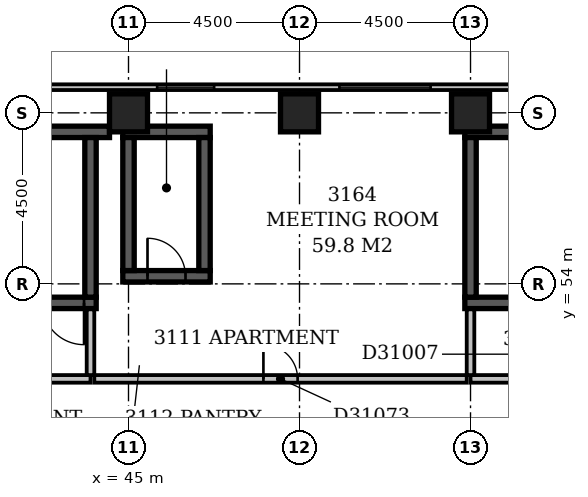
"""IFC4 building model, lengths in metres.
Left out: names, types, materials, properties, quantities, classifications, styles, units other than length and angle.
Written with IfcOpenShell. Run it as: python <this file> out.ifc"""

import sys

from ifc_helpers import new_model, si_unit, direction, frame, frame_2d, origin, origin_2d, place, context, subcontext, project, spatial, rectangle, extrude, element, fill, save


model = new_model("IFC4")
c1 = context("Model", 3, precision=1e-05, world=origin(), true_north=direction((0.0, 1.0)))
c2 = subcontext(c1, "Body", "Model", "MODEL_VIEW")
j1 = project(units=[si_unit("LENGTHUNIT", "METRE"), si_unit("PLANEANGLEUNIT", "RADIAN")], contexts=[c1])
p1 = place(None, origin())
s1 = spatial("IfcSite", under=j1, at=p1, CompositionType="ELEMENT")
p2 = place(p1, origin())
s2 = spatial("IfcBuilding", under=s1, at=p2, CompositionType="ELEMENT")
p3 = place(p2, frame((0.0, 0.0, 126.8)))
s3 = spatial("IfcBuildingStorey", under=s2, at=p3, CompositionType="ELEMENT", Elevation=126.8)
p4 = place(p3, frame((37.15, 53.5, -0.3), z_axis=(0.0, 0.0, 1.0), x_axis=(1.0, 0.0, 0.0)))
e1 = element("IfcWall", 1, at=p4, inside=s3, PredefinedType="SHEAR", context=c2, shape_type="SweptSolid", body=[
    extrude(rectangle(XDim=7.0, YDim=0.3, at=frame_2d((3.5, 0.0))), origin(), (0.0, 0.0, 1.0), 3.6),
])
p5 = place(p4, frame((5.58, 0.0, 0.3)))
e2 = element("IfcOpeningElement", 2, at=p5, cuts=e1, PredefinedType="OPENING", context=c2, shape_type="SweptSolid", body=[
    extrude(rectangle(XDim=1.1, YDim=2.1, at=frame_2d((0.55, 1.05))), frame((0.0, 0.162, 0.0), z_axis=(0.0, -1.0, 0.0), x_axis=(1.0, 0.0, 0.0)), (0.0, 0.0, 1.0), 0.324),
])
p6 = place(p3, frame((37.15, 58.0, -0.3), z_axis=(0.0, 0.0, 1.0), x_axis=(1.0, 0.0, 0.0)))
e3 = element("IfcWall", 3, at=p6, inside=s3, PredefinedType="SHEAR", context=c2, shape_type="SweptSolid", body=[
    extrude(rectangle(XDim=7.35, YDim=0.3, at=frame_2d((3.675, 0.0))), origin(), (0.0, 0.0, 1.0), 3.6),
])
p7 = place(p3, frame((44.0, 53.65, -0.3), z_axis=(0.0, 0.0, 1.0), x_axis=(0.0, 1.0, 0.0)))
e4 = element("IfcWall", 4, at=p7, inside=s3, PredefinedType="SHEAR", context=c2, shape_type="SweptSolid", body=[
    extrude(rectangle(XDim=4.2, YDim=0.3, at=frame_2d((2.1, 0.0))), origin(), (0.0, 0.0, 1.0), 3.6),
])
p8 = place(p3, frame((44.85, 54.2, -0.3), z_axis=(0.0, 0.0, 1.0), x_axis=(1.0, 0.0, 0.0)))
e5 = element("IfcWall", 5, at=p8, inside=s3, PredefinedType="SHEAR", context=c2, shape_type="SweptSolid", body=[
    extrude(rectangle(XDim=2.3, YDim=0.3, at=frame_2d((1.15, 0.0))), origin(), (0.0, 0.0, 1.0), 3.6),
])
p9 = place(p8, frame((0.65, 0.0, 0.3)))
e6 = element("IfcOpeningElement", 6, at=p9, cuts=e5, PredefinedType="OPENING", context=c2, shape_type="SweptSolid", body=[
    extrude(rectangle(XDim=1.0, YDim=2.1, at=frame_2d((0.5, 1.05))), frame((0.0, 0.162, 0.0), z_axis=(0.0, -1.0, 0.0), x_axis=(1.0, 0.0, 0.0)), (0.0, 0.0, 1.0), 0.324),
])
p10 = place(p3, frame((44.85, 58.0, -0.3), z_axis=(0.0, 0.0, 1.0), x_axis=(1.0, 0.0, 0.0)))
e7 = element("IfcWall", 7, at=p10, inside=s3, PredefinedType="SHEAR", context=c2, shape_type="SweptSolid", body=[
    extrude(rectangle(XDim=2.3, YDim=0.3, at=frame_2d((1.15, 0.0))), origin(), (0.0, 0.0, 1.0), 3.6),
])
for number, where, z_axis, x_axis in (
    (8, (45.0, 54.35, -0.3), (0.0, 0.0, 1.0), (0.0, 1.0, 0.0)),
    (9, (47.0, 54.35, -0.3), (0.0, 0.0, 1.0), (0.0, 1.0, 0.0)),
):
    element("IfcWall", number, at=place(p3, frame(where, z_axis=z_axis, x_axis=x_axis)), inside=s3, PredefinedType="SHEAR", context=c2, shape_type="SweptSolid", body=[
        extrude(rectangle(XDim=3.5, YDim=0.3, at=frame_2d((1.75, 0.0))), origin(), (0.0, 0.0, 1.0), 3.6),
    ])
p11 = place(p3, frame((53.85, 53.5, -0.3), z_axis=(0.0, 0.0, 1.0), x_axis=(1.0, 0.0, 0.0)))
e10 = element("IfcWall", 10, at=p11, inside=s3, PredefinedType="SHEAR", context=c2, shape_type="SweptSolid", body=[
    extrude(rectangle(XDim=7.0, YDim=0.3, at=frame_2d((3.5, 0.0))), origin(), (0.0, 0.0, 1.0), 3.6),
])
p12 = place(p11, frame((5.58, 0.0, 0.3)))
e11 = element("IfcOpeningElement", 11, at=p12, cuts=e10, PredefinedType="OPENING", context=c2, shape_type="SweptSolid", body=[
    extrude(rectangle(XDim=1.1, YDim=2.1, at=frame_2d((0.55, 1.05))), frame((0.0, 0.162, 0.0), z_axis=(0.0, -1.0, 0.0), x_axis=(1.0, 0.0, 0.0)), (0.0, 0.0, 1.0), 0.324),
])
p13 = place(p3, frame((53.85, 58.0, -0.3), z_axis=(0.0, 0.0, 1.0), x_axis=(1.0, 0.0, 0.0)))
e12 = element("IfcWall", 12, at=p13, inside=s3, PredefinedType="SHEAR", context=c2, shape_type="SweptSolid", body=[
    extrude(rectangle(XDim=7.0, YDim=0.3, at=frame_2d((3.5, 0.0))), origin(), (0.0, 0.0, 1.0), 3.6),
])
p14 = place(p3, frame((54.0, 53.65, -0.3), z_axis=(0.0, 0.0, 1.0), x_axis=(0.0, 1.0, 0.0)))
e13 = element("IfcWall", 13, at=p14, inside=s3, PredefinedType="SHEAR", context=c2, shape_type="SweptSolid", body=[
    extrude(rectangle(XDim=4.2, YDim=0.3, at=frame_2d((2.1, 0.0))), origin(), (0.0, 0.0, 1.0), 3.6),
])
for number, where, z_axis, x_axis in (
    (14, (45.0, 58.5, -0.3), (0.0, 0.0, 1.0), (1.0, 0.0, 0.0)),
    (15, (49.5, 58.5, -0.3), (0.0, 0.0, 1.0), (1.0, 0.0, 0.0)),
    (16, (54.0, 58.5, -0.3), (0.0, 0.0, 1.0), (1.0, 0.0, 0.0)),
):
    element("IfcColumn", number, at=place(p3, frame(where, z_axis=z_axis, x_axis=x_axis)), inside=s3, PredefinedType="COLUMN", context=c2, shape_type="SweptSolid", body=[
        extrude(rectangle(XDim=1.0, YDim=1.0, at=origin_2d()), origin(), (0.0, 0.0, 1.0), 3.6),
    ])
p15 = place(p3, frame((68.1, 59.175, 0.0), z_axis=(0.0, 0.0, 1.0), x_axis=(-1.0, 0.0, 0.0)))
e17 = element("IfcWall", 17, at=p15, inside=s3, PredefinedType="STANDARD", context=c2, shape_type="SweptSolid", body=[
    extrude(rectangle(XDim=68.85, YDim=0.15, at=frame_2d((34.425, 0.0))), origin(), (0.0, 0.0, 1.0), 2.7),
])
p16 = place(p15, frame((1.65, 0.0, 0.6)))
e18 = element("IfcOpeningElement", 18, at=p16, cuts=e17, PredefinedType="OPENING", context=c2, shape_type="SweptSolid", body=[
    extrude(rectangle(XDim=2.4, YDim=1.8, at=frame_2d((1.2, 0.9))), frame((0.0, 0.087, 0.0), z_axis=(0.0, -1.0, 0.0), x_axis=(1.0, 0.0, 0.0)), (0.0, 0.0, 1.0), 0.174),
])
p17 = place(p15, frame((5.854, 0.0, 0.6)))
e19 = element("IfcOpeningElement", 19, at=p17, cuts=e17, PredefinedType="OPENING", context=c2, shape_type="SweptSolid", body=[
    extrude(rectangle(XDim=1.5, YDim=1.8, at=frame_2d((0.75, 0.9))), frame((0.0, 0.087, 0.0), z_axis=(0.0, -1.0, 0.0), x_axis=(1.0, 0.0, 0.0)), (0.0, 0.0, 1.0), 0.174),
])
p18 = place(p15, frame((15.15, 0.0, 0.6)))
e20 = element("IfcOpeningElement", 20, at=p18, cuts=e17, PredefinedType="OPENING", context=c2, shape_type="SweptSolid", body=[
    extrude(rectangle(XDim=2.4, YDim=1.8, at=frame_2d((1.2, 0.9))), frame((0.0, 0.087, 0.0), z_axis=(0.0, -1.0, 0.0), x_axis=(1.0, 0.0, 0.0)), (0.0, 0.0, 1.0), 0.174),
])
p19 = place(p15, frame((20.847, 0.0, 0.6)))
e21 = element("IfcOpeningElement", 21, at=p19, cuts=e17, PredefinedType="OPENING", context=c2, shape_type="SweptSolid", body=[
    extrude(rectangle(XDim=1.5, YDim=1.8, at=frame_2d((0.75, 0.9))), frame((0.0, 0.087, 0.0), z_axis=(0.0, -1.0, 0.0), x_axis=(1.0, 0.0, 0.0)), (0.0, 0.0, 1.0), 0.174),
])
p20 = place(p15, frame((37.65, 0.0, 0.6)))
e22 = element("IfcOpeningElement", 22, at=p20, cuts=e17, PredefinedType="OPENING", context=c2, shape_type="SweptSolid", body=[
    extrude(rectangle(XDim=2.4, YDim=1.8, at=frame_2d((1.2, 0.9))), frame((0.0, 0.087, 0.0), z_axis=(0.0, -1.0, 0.0), x_axis=(1.0, 0.0, 0.0)), (0.0, 0.0, 1.0), 0.174),
])
p21 = place(p3, frame((37.3, 51.5, 0.0), z_axis=(0.0, 0.0, 1.0), x_axis=(1.0, 0.0, 0.0)))
e23 = element("IfcWall", 23, at=p21, inside=s3, PredefinedType="PARTITIONING", context=c2, shape_type="SweptSolid", body=[
    extrude(rectangle(XDim=6.7, YDim=0.2, at=frame_2d((3.35, 0.0))), origin(), (0.0, 0.0, 1.0), 3.3),
])
p22 = place(p21, frame((2.75, 0.0, 0.0)))
e24 = element("IfcOpeningElement", 24, at=p22, cuts=e23, PredefinedType="OPENING", context=c2, shape_type="SweptSolid", body=[
    extrude(rectangle(XDim=1.2, YDim=2.1, at=frame_2d((0.6, 1.05))), frame((0.0, 0.112, 0.0), z_axis=(0.0, -1.0, 0.0), x_axis=(1.0, 0.0, 0.0)), (0.0, 0.0, 1.0), 0.224),
])
p23 = place(p3, frame((44.0, 51.6, 0.0), z_axis=(0.0, 0.0, 1.0), x_axis=(0.0, 1.0, 0.0)))
e25 = element("IfcWall", 25, at=p23, inside=s3, PredefinedType="PARTITIONING", context=c2, shape_type="SweptSolid", body=[
    extrude(rectangle(XDim=1.73, YDim=0.2, at=frame_2d((0.865, 0.0))), origin(), (0.0, 0.0, 1.0), 3.3),
])
p24 = place(p3, frame((54.0, 51.5, 0.0), z_axis=(0.0, 0.0, 1.0), x_axis=(1.0, 0.0, 0.0)))
e26 = element("IfcWall", 26, at=p24, inside=s3, PredefinedType="PARTITIONING", context=c2, shape_type="SweptSolid", body=[
    extrude(rectangle(XDim=6.7, YDim=0.2, at=frame_2d((3.35, 0.0))), origin(), (0.0, 0.0, 1.0), 3.3),
])
p25 = place(p24, frame((2.75, 0.0, 0.0)))
e27 = element("IfcOpeningElement", 27, at=p25, cuts=e26, PredefinedType="OPENING", context=c2, shape_type="SweptSolid", body=[
    extrude(rectangle(XDim=1.2, YDim=2.1, at=frame_2d((0.6, 1.05))), frame((0.0, 0.112, 0.0), z_axis=(0.0, -1.0, 0.0), x_axis=(1.0, 0.0, 0.0)), (0.0, 0.0, 1.0), 0.224),
])
p26 = place(p3, frame((54.0, 51.6, 0.0), z_axis=(0.0, 0.0, 1.0), x_axis=(0.0, 1.0, 0.0)))
e28 = element("IfcWall", 28, at=p26, inside=s3, PredefinedType="PARTITIONING", context=c2, shape_type="SweptSolid", body=[
    extrude(rectangle(XDim=1.73, YDim=0.2, at=frame_2d((0.865, 0.0))), origin(), (0.0, 0.0, 1.0), 2.6),
])
p27 = place(p3, frame((44.1, 51.5, 0.0), z_axis=(0.0, 0.0, 1.0), x_axis=(1.0, 0.0, 0.0)))
e29 = element("IfcWall", 29, at=p27, inside=s3, PredefinedType="PARTITIONING", context=c2, shape_type="SweptSolid", body=[
    extrude(rectangle(XDim=9.8, YDim=0.2, at=frame_2d((4.9, 0.0))), origin(), (0.0, 0.0, 1.0), 3.3),
])
p28 = place(p27, frame((4.45, 0.0, 0.0)))
e30 = element("IfcOpeningElement", 30, at=p28, cuts=e29, PredefinedType="OPENING", context=c2, shape_type="SweptSolid", body=[
    extrude(rectangle(XDim=0.9, YDim=2.1, at=frame_2d((0.45, 1.05))), frame((0.0, 0.112, 0.0), z_axis=(0.0, -1.0, 0.0), x_axis=(1.0, 0.0, 0.0)), (0.0, 0.0, 1.0), 0.224),
])
p29 = place(p18, origin())
e31 = element("IfcWindow", 31, at=p29, inside=s3, PartitioningType="SINGLE_PANEL", PredefinedType="WINDOW", context=c2, shape_type="SweptSolid", body=[
    extrude(rectangle(XDim=2.4, YDim=1.8, at=frame_2d((1.2, 0.9))), frame((0.0, 0.03, 0.0), z_axis=(0.0, -1.0, 0.0), x_axis=(1.0, 0.0, 0.0)), (0.0, 0.0, 1.0), 0.06),
])
fill(e20, e31)
p30 = place(p19, origin())
e32 = element("IfcWindow", 32, at=p30, inside=s3, PartitioningType="SINGLE_PANEL", PredefinedType="WINDOW", context=c2, shape_type="SweptSolid", body=[
    extrude(rectangle(XDim=1.5, YDim=1.8, at=frame_2d((0.75, 0.9))), frame((0.0, 0.03, 0.0), z_axis=(0.0, -1.0, 0.0), x_axis=(1.0, 0.0, 0.0)), (0.0, 0.0, 1.0), 0.06),
])
fill(e21, e32)
p31 = place(p9, origin())
e33 = element("IfcDoor", 33, at=p31, inside=s3, OperationType="SINGLE_SWING_LEFT", PredefinedType="DOOR", context=c2, shape_type="SweptSolid", body=[
    extrude(rectangle(XDim=1.0, YDim=2.1, at=frame_2d((0.5, 1.05))), frame((0.0, 0.025, 0.0), z_axis=(0.0, -1.0, 0.0), x_axis=(1.0, 0.0, 0.0)), (0.0, 0.0, 1.0), 0.05),
])
fill(e6, e33)
p32 = place(p5, origin())
e34 = element("IfcDoor", 34, at=p32, inside=s3, OperationType="SINGLE_SWING_RIGHT", PredefinedType="DOOR", context=c2, shape_type="SweptSolid", body=[
    extrude(rectangle(XDim=1.1, YDim=2.1, at=frame_2d((0.55, 1.05))), frame((0.0, 0.025, 0.0), z_axis=(0.0, -1.0, 0.0), x_axis=(1.0, 0.0, 0.0)), (0.0, 0.0, 1.0), 0.05),
])
fill(e2, e34)
p33 = place(p28, origin())
e35 = element("IfcDoor", 35, at=p33, inside=s3, OperationType="SINGLE_SWING_LEFT", PredefinedType="DOOR", context=c2, shape_type="SweptSolid", body=[
    extrude(rectangle(XDim=0.9, YDim=2.1, at=frame_2d((0.45, 1.05))), frame((0.0, 0.025, 0.0), z_axis=(0.0, -1.0, 0.0), x_axis=(1.0, 0.0, 0.0)), (0.0, 0.0, 1.0), 0.05),
])
fill(e30, e35)
save(model, sys.argv[1])
